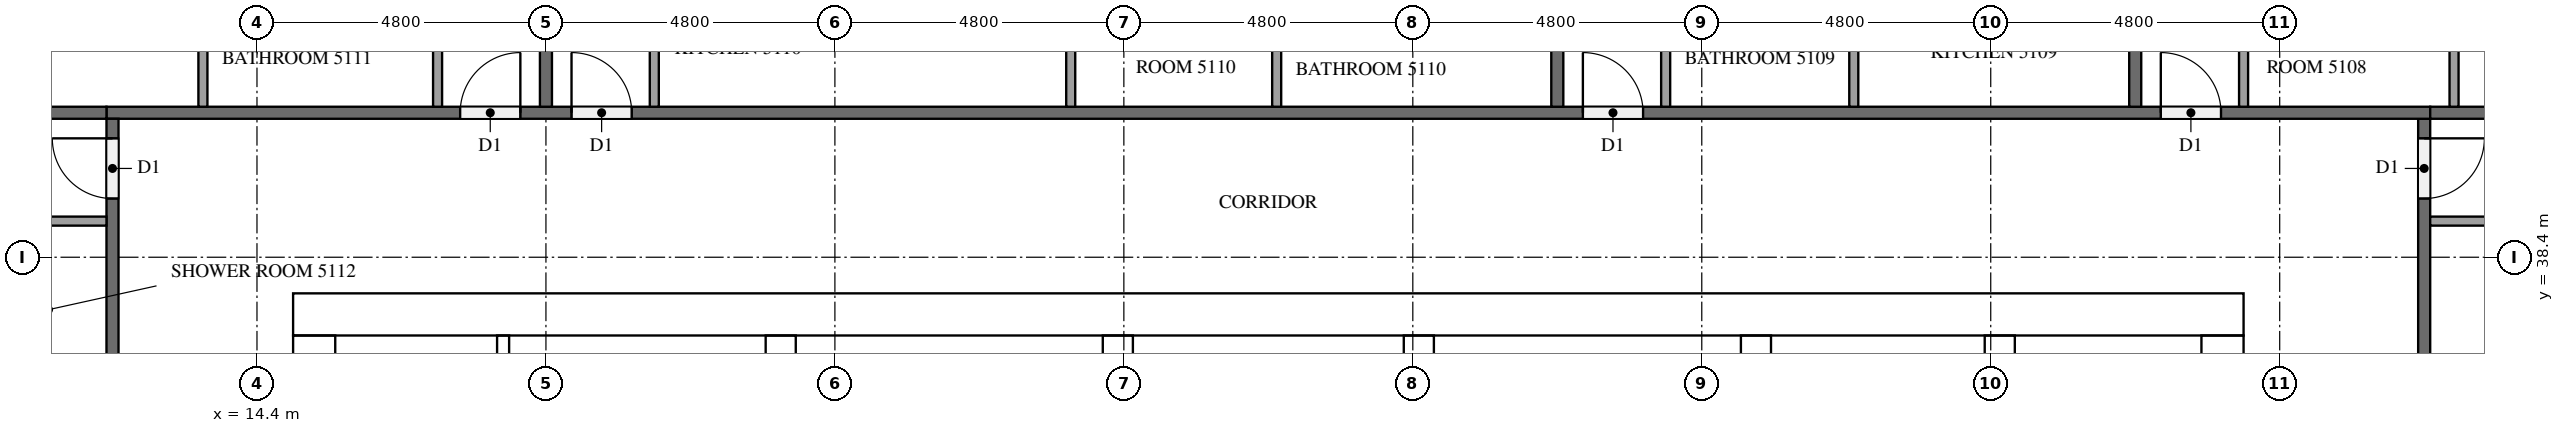
"""IFC4 building model, lengths in metres.
Left out: names, types, materials, properties, quantities, classifications, styles, units other than length and angle.
Written with IfcOpenShell. Run it as: python <this file> out.ifc"""

import sys

from ifc_helpers import new_model, si_unit, direction, frame, frame_2d, origin, place, context, subcontext, project, spatial, rectangle, extrude, element, fill, save


model = new_model("IFC4")
c1 = context("Model", 3, precision=1e-05, world=origin(), true_north=direction((0.0, 1.0)))
c2 = subcontext(c1, "Body", "Model", "MODEL_VIEW")
j1 = project(units=[si_unit("LENGTHUNIT", "METRE"), si_unit("PLANEANGLEUNIT", "RADIAN")], contexts=[c1])
p1 = place(None, origin())
s1 = spatial("IfcSite", under=j1, at=p1, CompositionType="ELEMENT")
p2 = place(p1, origin())
s2 = spatial("IfcBuilding", under=s1, at=p2, CompositionType="ELEMENT")
p3 = place(p2, frame((0.0, 0.0, 196.4)))
s3 = spatial("IfcBuildingStorey", under=s2, at=p3, CompositionType="ELEMENT", Elevation=196.4)
p4 = place(p3, frame((15.0, 37.45, 0.0), z_axis=(0.0, 0.0, 1.0), x_axis=(1.0, 0.0, 0.0)))
e1 = element("IfcWall", 1, at=p4, inside=s3, PredefinedType="SHEAR", context=c2, shape_type="SweptSolid", body=[
    extrude(rectangle(XDim=32.4, YDim=0.7, at=frame_2d((16.2, 0.0))), origin(), (0.0, 0.0, 1.0), 3.2),
])
p5 = place(p4, frame((15.3, 0.0, 0.0)))
e2 = element("IfcOpeningElement", 2, at=p5, cuts=e1, PredefinedType="OPENING", context=c2, shape_type="SweptSolid", body=[
    extrude(rectangle(XDim=1.8, YDim=2.1, at=frame_2d((0.9, 1.05))), frame((0.0, 0.36, 0.0), z_axis=(0.0, -1.0, 0.0), x_axis=(1.0, 0.0, 0.0)), (0.0, 0.0, 1.0), 0.72),
])
p6 = place(p4, frame((1.544, 0.0, 0.0)))
e3 = element("IfcOpeningElement", 3, at=p6, cuts=e1, PredefinedType="OPENING", context=c2, shape_type="SweptSolid", body=[
    extrude(rectangle(XDim=1.0, YDim=2.1, at=frame_2d((0.5, 1.05))), frame((0.0, 0.36, 0.0), z_axis=(0.0, -1.0, 0.0), x_axis=(1.0, 0.0, 0.0)), (0.0, 0.0, 1.0), 0.72),
])
p7 = place(p4, frame((5.219, 0.0, 0.0)))
e4 = element("IfcOpeningElement", 4, at=p7, cuts=e1, PredefinedType="OPENING", context=c2, shape_type="SweptSolid", body=[
    extrude(rectangle(XDim=1.0, YDim=2.1, at=frame_2d((0.5, 1.05))), frame((0.0, 0.36, 0.0), z_axis=(0.0, -1.0, 0.0), x_axis=(1.0, 0.0, 0.0)), (0.0, 0.0, 1.0), 0.72),
])
p8 = place(p3, frame((15.35, 15.7, 0.0), z_axis=(0.0, 0.0, 1.0), x_axis=(0.0, 1.0, 0.0)))
e5 = element("IfcWall", 5, at=p8, inside=s3, PredefinedType="SHEAR", context=c2, shape_type="SweptSolid", body=[
    extrude(rectangle(XDim=21.4, YDim=0.7, at=frame_2d((10.7, 0.0))), origin(), (0.0, 0.0, 1.0), 3.2),
])
p9 = place(p8, frame((5.06, 0.0, 0.0)))
e6 = element("IfcOpeningElement", 6, at=p9, cuts=e5, PredefinedType="OPENING", context=c2, shape_type="SweptSolid", body=[
    extrude(rectangle(XDim=1.2, YDim=2.1, at=frame_2d((0.6, 1.05))), frame((0.0, 0.36, 0.0), z_axis=(0.0, -1.0, 0.0), x_axis=(1.0, 0.0, 0.0)), (0.0, 0.0, 1.0), 0.72),
])
p10 = place(p3, frame((47.05, 15.7, 0.0), z_axis=(0.0, 0.0, 1.0), x_axis=(0.0, 1.0, 0.0)))
e7 = element("IfcWall", 7, at=p10, inside=s3, PredefinedType="SHEAR", context=c2, shape_type="SweptSolid", body=[
    extrude(rectangle(XDim=21.4, YDim=0.7, at=frame_2d((10.7, 0.0))), origin(), (0.0, 0.0, 1.0), 3.2),
])
p11 = place(p10, frame((10.4, 0.0, 0.0)))
e8 = element("IfcOpeningElement", 8, at=p11, cuts=e7, PredefinedType="OPENING", context=c2, shape_type="SweptSolid", body=[
    extrude(rectangle(XDim=1.2, YDim=2.1, at=frame_2d((0.6, 1.05))), frame((0.0, 0.36, 0.0), z_axis=(0.0, -1.0, 0.0), x_axis=(1.0, 0.0, 0.0)), (0.0, 0.0, 1.0), 0.72),
])
p12 = place(p3, frame((23.1, 15.7, 0.0), z_axis=(0.0, 0.0, 1.0), x_axis=(0.0, 1.0, 0.0)))
e9 = element("IfcWall", 9, at=p12, inside=s3, PredefinedType="SHEAR", context=c2, shape_type="SweptSolid", body=[
    extrude(rectangle(XDim=21.4, YDim=0.5, at=frame_2d((10.7, 0.0))), origin(), (0.0, 0.0, 1.0), 3.2),
])
p13 = place(p3, frame((39.3, 27.75, 0.0), z_axis=(0.0, 0.0, 1.0), x_axis=(0.0, 1.0, 0.0)))
e10 = element("IfcWall", 10, at=p13, inside=s3, PredefinedType="SHEAR", context=c2, shape_type="SweptSolid", body=[
    extrude(rectangle(XDim=9.35, YDim=0.5, at=frame_2d((4.675, 0.0))), origin(), (0.0, 0.0, 1.0), 3.2),
])
p14 = place(p3, frame((43.35, 27.75, 0.0), z_axis=(0.0, 0.0, 1.0), x_axis=(0.0, 1.0, 0.0)))
e11 = element("IfcWall", 11, at=p14, inside=s3, PredefinedType="SHEAR", context=c2, shape_type="SweptSolid", body=[
    extrude(rectangle(XDim=9.35, YDim=0.5, at=frame_2d((4.675, 0.0))), origin(), (0.0, 0.0, 1.0), 3.2),
])
p15 = place(p14, frame((7.65, 0.0, 0.0)))
e12 = element("IfcOpeningElement", 12, at=p15, cuts=e11, PredefinedType="OPENING", context=c2, shape_type="SweptSolid", body=[
    extrude(rectangle(XDim=1.2, YDim=2.1, at=frame_2d((0.6, 1.05))), frame((0.0, 0.26, 0.0), z_axis=(0.0, -1.0, 0.0), x_axis=(1.0, 0.0, 0.0)), (0.0, 0.0, 1.0), 0.52),
])
for number, where, z_axis, x_axis in (
    (13, (28.7, 33.8, 0.0), (0.0, 0.0, 1.0), (0.0, 1.0, 0.0)),
    (14, (33.7, 33.8, 0.0), (0.0, 0.0, 1.0), (0.0, 1.0, 0.0)),
):
    element("IfcWall", number, at=place(p3, frame(where, z_axis=z_axis, x_axis=x_axis)), inside=s3, PredefinedType="SHEAR", context=c2, shape_type="SweptSolid", body=[
        extrude(rectangle(XDim=3.3, YDim=0.5, at=frame_2d((1.65, 0.0))), origin(), (0.0, 0.0, 1.0), 3.2),
    ])
p16 = place(p3, frame((18.489, 31.5, 0.0), z_axis=(0.0, 0.0, 1.0), x_axis=(0.0, 1.0, 0.0)))
e15 = element("IfcWall", 15, at=p16, inside=s3, PredefinedType="PARTITIONING", context=c2, shape_type="SweptSolid", body=[
    extrude(rectangle(XDim=5.6, YDim=0.2, at=frame_2d((2.8, 0.0))), origin(), (0.0, 0.0, 1.0), 3.2),
])
p17 = place(p3, frame((50.4, 40.7, 0.0), z_axis=(0.0, 0.0, 1.0), x_axis=(0.0, -1.0, 0.0)))
e16 = element("IfcWall", 16, at=p17, inside=s3, PredefinedType="PARTITIONING", context=c2, shape_type="SweptSolid", body=[
    extrude(rectangle(XDim=28.6, YDim=0.2, at=frame_2d((14.3, 0.0))), origin(), (0.0, 0.0, 1.0), 3.2),
])
p18 = place(p17, frame((21.925, 0.0, 0.0)))
e17 = element("IfcOpeningElement", 17, at=p18, cuts=e16, PredefinedType="OPENING", context=c2, shape_type="SweptSolid", body=[
    extrude(rectangle(XDim=1.0, YDim=2.1, at=frame_2d((0.5, 1.05))), frame((0.0, 0.11, 0.0), z_axis=(0.0, -1.0, 0.0), x_axis=(1.0, 0.0, 0.0)), (0.0, 0.0, 1.0), 0.22),
])
p19 = place(p17, frame((20.075, 0.0, 0.0)))
e18 = element("IfcOpeningElement", 18, at=p19, cuts=e16, PredefinedType="OPENING", context=c2, shape_type="SweptSolid", body=[
    extrude(rectangle(XDim=1.0, YDim=2.1, at=frame_2d((0.5, 1.05))), frame((0.0, 0.11, 0.0), z_axis=(0.0, -1.0, 0.0), x_axis=(1.0, 0.0, 0.0)), (0.0, 0.0, 1.0), 0.22),
])
p20 = place(p17, frame((0.325, 0.0, 0.0)))
e19 = element("IfcOpeningElement", 19, at=p20, cuts=e16, PredefinedType="OPENING", context=c2, shape_type="SweptSolid", body=[
    extrude(rectangle(XDim=1.0, YDim=2.1, at=frame_2d((0.5, 1.05))), frame((0.0, 0.11, 0.0), z_axis=(0.0, -1.0, 0.0), x_axis=(1.0, 0.0, 0.0)), (0.0, 0.0, 1.0), 0.22),
])
p21 = place(p3, frame((11.9, 40.8, 0.0), z_axis=(0.0, 0.0, 1.0), x_axis=(1.0, 0.0, 0.0)))
e20 = element("IfcWall", 20, at=p21, inside=s3, PredefinedType="PARTITIONING", context=c2, shape_type="SweptSolid", body=[
    extrude(rectangle(XDim=38.6, YDim=0.2, at=frame_2d((19.3, 0.0))), origin(), (0.0, 0.0, 1.0), 3.2),
])
p22 = place(p21, frame((34.125, 0.0, 0.0)))
e21 = element("IfcOpeningElement", 21, at=p22, cuts=e20, PredefinedType="OPENING", context=c2, shape_type="SweptSolid", body=[
    extrude(rectangle(XDim=1.0, YDim=2.1, at=frame_2d((0.5, 1.05))), frame((0.0, 0.11, 0.0), z_axis=(0.0, -1.0, 0.0), x_axis=(1.0, 0.0, 0.0)), (0.0, 0.0, 1.0), 0.22),
])
p23 = place(p21, frame((24.525, 0.0, 0.0)))
e22 = element("IfcOpeningElement", 22, at=p23, cuts=e20, PredefinedType="OPENING", context=c2, shape_type="SweptSolid", body=[
    extrude(rectangle(XDim=1.0, YDim=2.1, at=frame_2d((0.5, 1.05))), frame((0.0, 0.11, 0.0), z_axis=(0.0, -1.0, 0.0), x_axis=(1.0, 0.0, 0.0)), (0.0, 0.0, 1.0), 0.22),
])
p24 = place(p21, frame((7.725, 0.0, 0.0)))
e23 = element("IfcOpeningElement", 23, at=p24, cuts=e20, PredefinedType="OPENING", context=c2, shape_type="SweptSolid", body=[
    extrude(rectangle(XDim=1.0, YDim=2.1, at=frame_2d((0.5, 1.05))), frame((0.0, 0.11, 0.0), z_axis=(0.0, -1.0, 0.0), x_axis=(1.0, 0.0, 0.0)), (0.0, 0.0, 1.0), 0.22),
])
p25 = place(p21, frame((5.875, 0.0, 0.0)))
e24 = element("IfcOpeningElement", 24, at=p25, cuts=e20, PredefinedType="OPENING", context=c2, shape_type="SweptSolid", body=[
    extrude(rectangle(XDim=1.0, YDim=2.1, at=frame_2d((0.5, 1.05))), frame((0.0, 0.11, 0.0), z_axis=(0.0, -1.0, 0.0), x_axis=(1.0, 0.0, 0.0)), (0.0, 0.0, 1.0), 0.22),
])
p26 = place(p3, frame((12.0, 12.1, 0.0), z_axis=(0.0, 0.0, 1.0), x_axis=(0.0, 1.0, 0.0)))
e25 = element("IfcWall", 25, at=p26, inside=s3, PredefinedType="PARTITIONING", context=c2, shape_type="SweptSolid", body=[
    extrude(rectangle(XDim=28.6, YDim=0.2, at=frame_2d((14.3, 0.0))), origin(), (0.0, 0.0, 1.0), 3.2),
])
p27 = place(p26, frame((27.275, 0.0, 0.0)))
e26 = element("IfcOpeningElement", 26, at=p27, cuts=e25, PredefinedType="OPENING", context=c2, shape_type="SweptSolid", body=[
    extrude(rectangle(XDim=1.0, YDim=2.1, at=frame_2d((0.5, 1.05))), frame((0.0, 0.11, 0.0), z_axis=(0.0, -1.0, 0.0), x_axis=(1.0, 0.0, 0.0)), (0.0, 0.0, 1.0), 0.22),
])
p28 = place(p26, frame((0.325, 0.0, 0.0)))
e27 = element("IfcOpeningElement", 27, at=p28, cuts=e25, PredefinedType="OPENING", context=c2, shape_type="SweptSolid", body=[
    extrude(rectangle(XDim=1.0, YDim=2.1, at=frame_2d((0.5, 1.05))), frame((0.0, 0.11, 0.0), z_axis=(0.0, -1.0, 0.0), x_axis=(1.0, 0.0, 0.0)), (0.0, 0.0, 1.0), 0.22),
])
p29 = place(p3, frame((50.5, 40.8, 0.0), z_axis=(0.0, 0.0, 1.0), x_axis=(1.0, 0.0, 0.0)))
e28 = element("IfcWall", 28, at=p29, inside=s3, PredefinedType="PARTITIONING", context=c2, shape_type="SweptSolid", body=[
    extrude(rectangle(XDim=11.8, YDim=0.2, at=frame_2d((5.9, 0.0))), origin(), (0.0, 0.0, 1.0), 3.2),
])
for number, where, z_axis, x_axis in (
    (29, (45.6, 47.9, 0.0), (0.0, 0.0, 1.0), (0.0, -1.0, 0.0)),
    (30, (36.0, 47.9, 0.0), (0.0, 0.0, 1.0), (0.0, -1.0, 0.0)),
):
    element("IfcWall", number, at=place(p3, frame(where, z_axis=z_axis, x_axis=x_axis)), inside=s3, PredefinedType="PARTITIONING", context=c2, shape_type="SweptSolid", body=[
        extrude(rectangle(XDim=7.0, YDim=0.2, at=frame_2d((3.5, 0.0))), origin(), (0.0, 0.0, 1.0), 3.2),
    ])
p30 = place(p3, frame((19.2, 47.675, 0.0), z_axis=(0.0, 0.0, 1.0), x_axis=(0.0, -1.0, 0.0)))
e31 = element("IfcWall", 31, at=p30, inside=s3, PredefinedType="PARTITIONING", context=c2, shape_type="SweptSolid", body=[
    extrude(rectangle(XDim=6.775, YDim=0.2, at=frame_2d((3.388, 0.0))), origin(), (0.0, 0.0, 1.0), 3.2),
])
p31 = place(p3, frame((4.9, 40.8, 0.0), z_axis=(0.0, 0.0, 1.0), x_axis=(1.0, 0.0, 0.0)))
e32 = element("IfcWall", 32, at=p31, inside=s3, PredefinedType="PARTITIONING", context=c2, shape_type="SweptSolid", body=[
    extrude(rectangle(XDim=7.0, YDim=0.2, at=frame_2d((3.5, 0.0))), origin(), (0.0, 0.0, 1.0), 3.2),
])
p32 = place(p3, frame((50.5, 39.0, 0.0), z_axis=(0.0, 0.0, 1.0), x_axis=(1.0, 0.0, 0.0)))
e33 = element("IfcWall", 33, at=p32, inside=s3, PredefinedType="PARTITIONING", context=c2, shape_type="SweptSolid", body=[
    extrude(rectangle(XDim=3.875, YDim=0.15, at=frame_2d((1.938, 0.0))), origin(), (0.0, 0.0, 1.0), 3.2),
])
p33 = place(p3, frame((50.896, 40.9, 0.0), z_axis=(0.0, 0.0, 1.0), x_axis=(0.0, 1.0, 0.0)))
e34 = element("IfcWall", 34, at=p33, inside=s3, PredefinedType="PARTITIONING", context=c2, shape_type="SweptSolid", body=[
    extrude(rectangle(XDim=1.925, YDim=0.15, at=frame_2d((0.962, 0.0))), origin(), (0.0, 0.0, 1.0), 3.2),
])
p34 = place(p3, frame((47.4, 40.9, 0.0), z_axis=(0.0, 0.0, 1.0), x_axis=(0.0, 1.0, 0.0)))
e35 = element("IfcWall", 35, at=p34, inside=s3, PredefinedType="PARTITIONING", context=c2, shape_type="SweptSolid", body=[
    extrude(rectangle(XDim=2.075, YDim=0.15, at=frame_2d((1.038, 0.0))), origin(), (0.0, 0.0, 1.0), 3.2),
])
p35 = place(p3, frame((40.925, 40.9, 0.0), z_axis=(0.0, 0.0, 1.0), x_axis=(0.0, 1.0, 0.0)))
e36 = element("IfcWall", 36, at=p35, inside=s3, PredefinedType="PARTITIONING", context=c2, shape_type="SweptSolid", body=[
    extrude(rectangle(XDim=1.775, YDim=0.15, at=frame_2d((0.888, 0.0))), origin(), (0.0, 0.0, 1.0), 3.2),
])
for number, where, z_axis, x_axis in (
    (37, (37.8, 40.9, 0.0), (0.0, 0.0, 1.0), (0.0, 1.0, 0.0)),
    (38, (27.917, 40.9, 0.0), (0.0, 0.0, 1.0), (0.0, 1.0, 0.0)),
    (39, (31.338, 40.9, 0.0), (0.0, 0.0, 1.0), (0.0, 1.0, 0.0)),
):
    element("IfcWall", number, at=place(p3, frame(where, z_axis=z_axis, x_axis=x_axis)), inside=s3, PredefinedType="PARTITIONING", context=c2, shape_type="SweptSolid", body=[
        extrude(rectangle(XDim=1.925, YDim=0.15, at=frame_2d((0.962, 0.0))), origin(), (0.0, 0.0, 1.0), 3.2),
    ])
for number, where, z_axis, x_axis in (
    (40, (21.0, 40.9, 0.0), (0.0, 0.0, 1.0), (0.0, 1.0, 0.0)),
    (41, (13.502, 40.9, 0.0), (0.0, 0.0, 1.0), (0.0, 1.0, 0.0)),
):
    element("IfcWall", number, at=place(p3, frame(where, z_axis=z_axis, x_axis=x_axis)), inside=s3, PredefinedType="PARTITIONING", context=c2, shape_type="SweptSolid", body=[
        extrude(rectangle(XDim=2.075, YDim=0.15, at=frame_2d((1.038, 0.0))), origin(), (0.0, 0.0, 1.0), 3.2),
    ])
p36 = place(p3, frame((17.4, 40.9, 0.0), z_axis=(0.0, 0.0, 1.0), x_axis=(0.0, 1.0, 0.0)))
e42 = element("IfcWall", 42, at=p36, inside=s3, PredefinedType="PARTITIONING", context=c2, shape_type="SweptSolid", body=[
    extrude(rectangle(XDim=2.225, YDim=0.15, at=frame_2d((1.113, 0.0))), origin(), (0.0, 0.0, 1.0), 3.2),
])
p37 = place(p3, frame((11.9, 39.0, 0.0), z_axis=(0.0, 0.0, 1.0), x_axis=(-1.0, 0.0, 0.0)))
e43 = element("IfcWall", 43, at=p37, inside=s3, PredefinedType="PARTITIONING", context=c2, shape_type="SweptSolid", body=[
    extrude(rectangle(XDim=2.075, YDim=0.15, at=frame_2d((1.038, 0.0))), origin(), (0.0, 0.0, 1.0), 3.2),
])
p38 = place(p5, origin())
e44 = element("IfcDoor", 44, at=p38, inside=s3, OperationType="DOUBLE_DOOR_SINGLE_SWING", PredefinedType="DOOR", context=c2, shape_type="SweptSolid", body=[
    extrude(rectangle(XDim=1.8, YDim=2.1, at=frame_2d((0.9, 1.05))), frame((0.0, 0.025, 0.0), z_axis=(0.0, -1.0, 0.0), x_axis=(1.0, 0.0, 0.0)), (0.0, 0.0, 1.0), 0.05),
])
fill(e2, e44)
p39 = place(p6, origin())
e45 = element("IfcDoor", 45, at=p39, inside=s3, OperationType="SINGLE_SWING_RIGHT", PredefinedType="DOOR", context=c2, shape_type="SweptSolid", body=[
    extrude(rectangle(XDim=1.0, YDim=2.1, at=frame_2d((0.5, 1.05))), frame((0.0, 0.025, 0.0), z_axis=(0.0, -1.0, 0.0), x_axis=(1.0, 0.0, 0.0)), (0.0, 0.0, 1.0), 0.05),
])
fill(e3, e45)
p40 = place(p7, origin())
e46 = element("IfcDoor", 46, at=p40, inside=s3, OperationType="SINGLE_SWING_LEFT", PredefinedType="DOOR", context=c2, shape_type="SweptSolid", body=[
    extrude(rectangle(XDim=1.0, YDim=2.1, at=frame_2d((0.5, 1.05))), frame((0.0, 0.025, 0.0), z_axis=(0.0, -1.0, 0.0), x_axis=(1.0, 0.0, 0.0)), (0.0, 0.0, 1.0), 0.05),
])
fill(e4, e46)
p41 = place(p20, origin())
e47 = element("IfcDoor", 47, at=p41, inside=s3, OperationType="SINGLE_SWING_LEFT", PredefinedType="DOOR", context=c2, shape_type="SweptSolid", body=[
    extrude(rectangle(XDim=1.0, YDim=2.1, at=frame_2d((0.5, 1.05))), frame((0.0, 0.025, 0.0), z_axis=(0.0, -1.0, 0.0), x_axis=(1.0, 0.0, 0.0)), (0.0, 0.0, 1.0), 0.05),
])
fill(e19, e47)
p42 = place(p22, origin())
e48 = element("IfcDoor", 48, at=p42, inside=s3, OperationType="SINGLE_SWING_LEFT", PredefinedType="DOOR", context=c2, shape_type="SweptSolid", body=[
    extrude(rectangle(XDim=1.0, YDim=2.1, at=frame_2d((0.5, 1.05))), frame((0.0, 0.025, 0.0), z_axis=(0.0, -1.0, 0.0), x_axis=(1.0, 0.0, 0.0)), (0.0, 0.0, 1.0), 0.05),
])
fill(e21, e48)
p43 = place(p23, origin())
e49 = element("IfcDoor", 49, at=p43, inside=s3, OperationType="SINGLE_SWING_LEFT", PredefinedType="DOOR", context=c2, shape_type="SweptSolid", body=[
    extrude(rectangle(XDim=1.0, YDim=2.1, at=frame_2d((0.5, 1.05))), frame((0.0, 0.025, 0.0), z_axis=(0.0, -1.0, 0.0), x_axis=(1.0, 0.0, 0.0)), (0.0, 0.0, 1.0), 0.05),
])
fill(e22, e49)
p44 = place(p24, origin())
e50 = element("IfcDoor", 50, at=p44, inside=s3, OperationType="SINGLE_SWING_LEFT", PredefinedType="DOOR", context=c2, shape_type="SweptSolid", body=[
    extrude(rectangle(XDim=1.0, YDim=2.1, at=frame_2d((0.5, 1.05))), frame((0.0, 0.025, 0.0), z_axis=(0.0, -1.0, 0.0), x_axis=(1.0, 0.0, 0.0)), (0.0, 0.0, 1.0), 0.05),
])
fill(e23, e50)
p45 = place(p25, origin())
e51 = element("IfcDoor", 51, at=p45, inside=s3, OperationType="SINGLE_SWING_RIGHT", PredefinedType="DOOR", context=c2, shape_type="SweptSolid", body=[
    extrude(rectangle(XDim=1.0, YDim=2.1, at=frame_2d((0.5, 1.05))), frame((0.0, 0.025, 0.0), z_axis=(0.0, -1.0, 0.0), x_axis=(1.0, 0.0, 0.0)), (0.0, 0.0, 1.0), 0.05),
])
fill(e24, e51)
p46 = place(p27, origin())
e52 = element("IfcDoor", 52, at=p46, inside=s3, OperationType="SINGLE_SWING_RIGHT", PredefinedType="DOOR", context=c2, shape_type="SweptSolid", body=[
    extrude(rectangle(XDim=1.0, YDim=2.1, at=frame_2d((0.5, 1.05))), frame((0.0, 0.025, 0.0), z_axis=(0.0, -1.0, 0.0), x_axis=(1.0, 0.0, 0.0)), (0.0, 0.0, 1.0), 0.05),
])
fill(e26, e52)
save(model, sys.argv[1])
